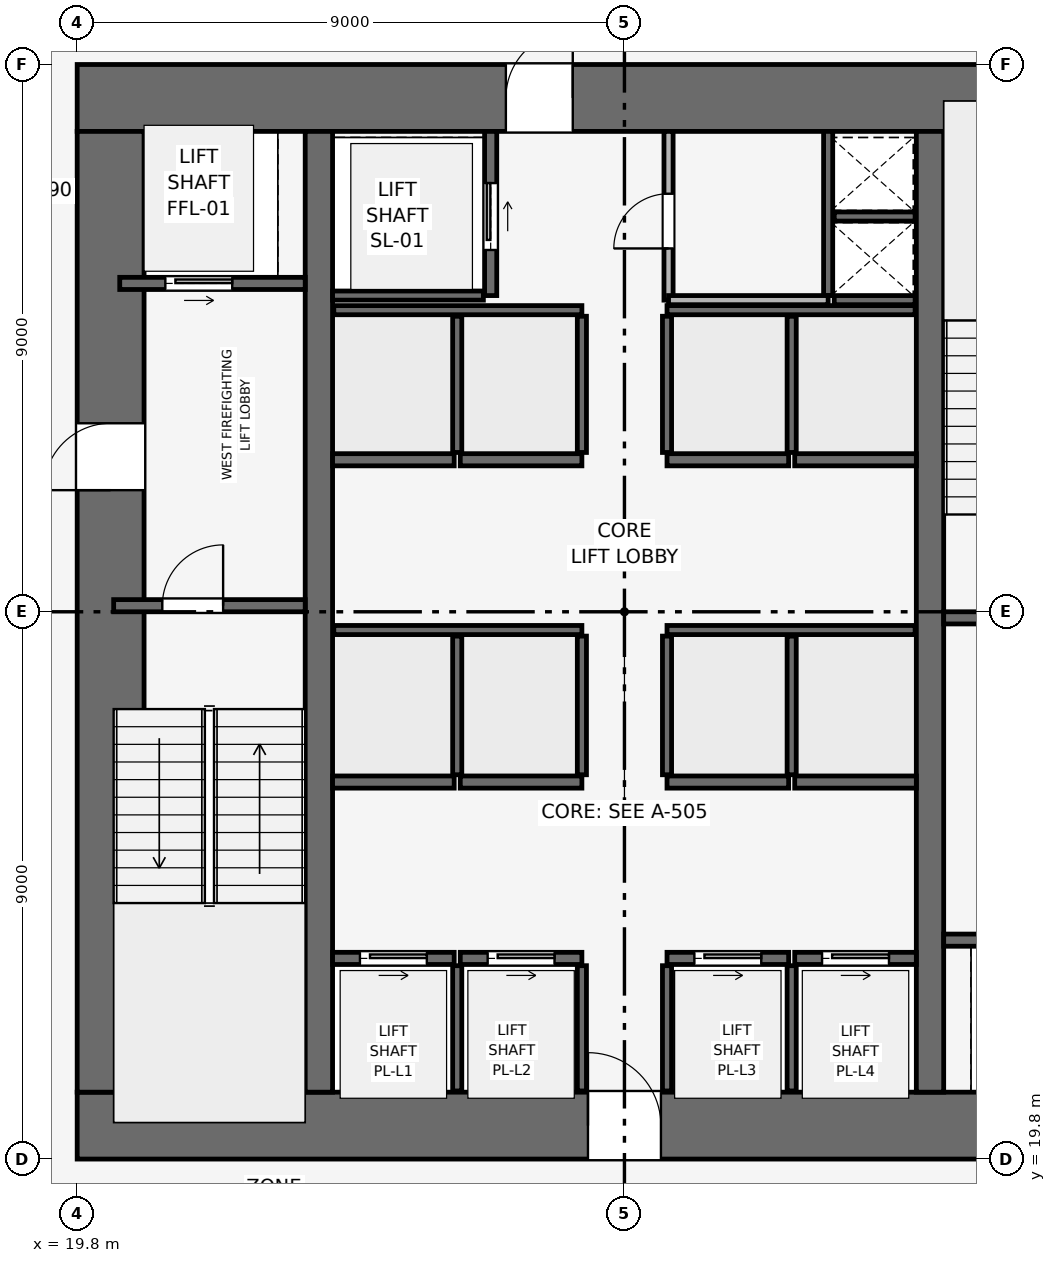
"""IFC4 building model, lengths in metres.
Left out: names, types, materials, properties, quantities, classifications, styles, units other than length and angle.
Written with IfcOpenShell. Run it as: python <this file> out.ifc"""

import sys

from ifc_helpers import new_model, si_unit, direction, frame, frame_2d, origin, place, context, subcontext, project, spatial, rectangle, extrude, element, fill, save


model = new_model("IFC4")
c1 = context("Model", 3, precision=1e-05, world=origin(), true_north=direction((0.0, 1.0)))
c2 = subcontext(c1, "Body", "Model", "MODEL_VIEW")
j1 = project(units=[si_unit("LENGTHUNIT", "METRE"), si_unit("PLANEANGLEUNIT", "RADIAN")], contexts=[c1])
p1 = place(None, origin())
s1 = spatial("IfcSite", under=j1, at=p1, CompositionType="ELEMENT")
p2 = place(p1, origin())
s2 = spatial("IfcBuilding", under=s1, at=p2, CompositionType="ELEMENT")
p3 = place(p2, frame((0.0, 0.0, 72.9)))
s3 = spatial("IfcBuildingStorey", under=s2, at=p3, CompositionType="ELEMENT", Elevation=72.9)
p4 = place(p3, frame((19.8, 20.35, 0.0), z_axis=(0.0, 0.0, 1.0), x_axis=(1.0, 0.0, 0.0)))
e1 = element("IfcWall", 1, at=p4, inside=s3, PredefinedType="SHEAR", context=c2, shape_type="SweptSolid", body=[
    extrude(rectangle(XDim=18.0, YDim=1.1, at=frame_2d((9.0, 0.0))), origin(), (0.0, 0.0, 1.0), 3.9),
])
p5 = place(p4, frame((8.4, 0.0, 0.0)))
e2 = element("IfcOpeningElement", 2, at=p5, cuts=e1, PredefinedType="OPENING", context=c2, shape_type="SweptSolid", body=[
    extrude(rectangle(XDim=1.2, YDim=2.2, at=frame_2d((0.6, 1.1))), frame((0.0, 0.56, 0.0), z_axis=(0.0, -1.0, 0.0), x_axis=(1.0, 0.0, 0.0)), (0.0, 0.0, 1.0), 1.12),
])
p6 = place(p3, frame((19.8, 37.25, 0.0), z_axis=(0.0, 0.0, 1.0), x_axis=(1.0, 0.0, 0.0)))
e3 = element("IfcWall", 3, at=p6, inside=s3, PredefinedType="SHEAR", context=c2, shape_type="SweptSolid", body=[
    extrude(rectangle(XDim=18.0, YDim=1.1, at=frame_2d((9.0, 0.0))), origin(), (0.0, 0.0, 1.0), 3.9),
])
p7 = place(p6, frame((7.05, 0.0, 0.0)))
e4 = element("IfcOpeningElement", 4, at=p7, cuts=e3, PredefinedType="OPENING", context=c2, shape_type="SweptSolid", body=[
    extrude(rectangle(XDim=1.1, YDim=2.15, at=frame_2d((0.55, 1.075))), frame((0.0, 0.56, 0.0), z_axis=(0.0, -1.0, 0.0), x_axis=(1.0, 0.0, 0.0)), (0.0, 0.0, 1.0), 1.12),
])
p8 = place(p3, frame((20.35, 20.9, 0.0), z_axis=(0.0, 0.0, 1.0), x_axis=(0.0, 1.0, 0.0)))
e5 = element("IfcWall", 5, at=p8, inside=s3, PredefinedType="SHEAR", context=c2, shape_type="SweptSolid", body=[
    extrude(rectangle(XDim=15.8, YDim=1.1, at=frame_2d((7.9, 0.0))), origin(), (0.0, 0.0, 1.0), 3.9),
])
p9 = place(p8, frame((9.9, 0.0, 0.0)))
e6 = element("IfcOpeningElement", 6, at=p9, cuts=e5, PredefinedType="OPENING", context=c2, shape_type="SweptSolid", body=[
    extrude(rectangle(XDim=1.1, YDim=2.15, at=frame_2d((0.55, 1.075))), frame((0.0, 0.56, 0.0), z_axis=(0.0, -1.0, 0.0), x_axis=(1.0, 0.0, 0.0)), (0.0, 0.0, 1.0), 1.12),
])
for number, where, z_axis, x_axis in (
    (7, (23.775, 20.9, 0.0), (0.0, 0.0, 1.0), (0.0, 1.0, 0.0)),
    (8, (33.825, 20.9, 0.0), (0.0, 0.0, 1.0), (0.0, 1.0, 0.0)),
):
    element("IfcWall", number, at=place(p3, frame(where, z_axis=z_axis, x_axis=x_axis)), inside=s3, PredefinedType="SHEAR", context=c2, shape_type="SweptSolid", body=[
        extrude(rectangle(XDim=15.8, YDim=0.45, at=frame_2d((7.9, 0.0))), origin(), (0.0, 0.0, 1.0), 3.9),
    ])
p10 = place(p3, frame((20.4, 28.9, 0.0), z_axis=(0.0, 0.0, 1.0), x_axis=(1.0, 0.0, 0.0)))
e9 = element("IfcWall", 9, at=p10, inside=s3, PredefinedType="SHEAR", context=c2, shape_type="SweptSolid", body=[
    extrude(rectangle(XDim=3.15, YDim=0.2, at=frame_2d((1.575, 0.0))), origin(), (0.0, 0.0, 1.0), 3.65),
])
p11 = place(p10, frame((0.8, 0.0, 0.0)))
e10 = element("IfcOpeningElement", 10, at=p11, cuts=e9, PredefinedType="OPENING", context=c2, shape_type="SweptSolid", body=[
    extrude(rectangle(XDim=1.0, YDim=2.1, at=frame_2d((0.5, 1.05))), frame((0.0, 0.11, 0.0), z_axis=(0.0, -1.0, 0.0), x_axis=(1.0, 0.0, 0.0)), (0.0, 0.0, 1.0), 0.22),
])
p12 = place(p3, frame((34.05, 28.7, 0.0), z_axis=(0.0, 0.0, 1.0), x_axis=(1.0, 0.0, 0.0)))
e11 = element("IfcWall", 11, at=p12, inside=s3, PredefinedType="SHEAR", context=c2, shape_type="SweptSolid", body=[
    extrude(rectangle(XDim=3.15, YDim=0.2, at=frame_2d((1.575, 0.0))), origin(), (0.0, 0.0, 1.0), 3.65),
])
p13 = place(p12, frame((0.8, 0.0, 0.0)))
e12 = element("IfcOpeningElement", 12, at=p13, cuts=e11, PredefinedType="OPENING", context=c2, shape_type="SweptSolid", body=[
    extrude(rectangle(XDim=1.0, YDim=2.1, at=frame_2d((0.5, 1.05))), frame((0.0, 0.11, 0.0), z_axis=(0.0, -1.0, 0.0), x_axis=(1.0, 0.0, 0.0)), (0.0, 0.0, 1.0), 0.22),
])
p14 = place(p3, frame((32.15, 34.0, 0.0), z_axis=(0.0, 0.0, 1.0), x_axis=(0.0, 1.0, 0.0)))
e13 = element("IfcWall", 13, at=p14, inside=s3, PredefinedType="SHEAR", context=c2, shape_type="SweptSolid", body=[
    extrude(rectangle(XDim=2.7, YDim=0.15, at=frame_2d((1.35, 0.0))), origin(), (0.0, 0.0, 1.0), 3.65),
])
for number, where, z_axis, x_axis in (
    (14, (32.25, 33.925, 0.0), (0.0, 0.0, 1.0), (1.0, 0.0, 0.0)),
    (15, (32.25, 35.3, 0.0), (0.0, 0.0, 1.0), (1.0, 0.0, 0.0)),
):
    element("IfcWall", number, at=place(p3, frame(where, z_axis=z_axis, x_axis=x_axis)), inside=s3, PredefinedType="SHEAR", context=c2, shape_type="SweptSolid", body=[
        extrude(rectangle(XDim=1.33, YDim=0.15, at=frame_2d((0.665, 0.0))), origin(), (0.0, 0.0, 1.0), 3.65),
    ])
p15 = place(p3, frame((20.5, 34.2, 0.0), z_axis=(0.0, 0.0, 1.0), x_axis=(1.0, 0.0, 0.0)))
e16 = element("IfcWall", 16, at=p15, inside=s3, PredefinedType="SHEAR", context=c2, shape_type="SweptSolid", body=[
    extrude(rectangle(XDim=3.05, YDim=0.2, at=frame_2d((1.525, 0.0))), origin(), (0.0, 0.0, 1.0), 3.65),
])
p16 = place(p15, frame((0.75, 0.0, 0.0)))
e17 = element("IfcOpeningElement", 17, at=p16, cuts=e16, PredefinedType="OPENING", context=c2, shape_type="SweptSolid", body=[
    extrude(rectangle(XDim=1.1, YDim=2.15, at=frame_2d((0.55, 1.075))), frame((0.0, 0.11, 0.0), z_axis=(0.0, -1.0, 0.0), x_axis=(1.0, 0.0, 0.0)), (0.0, 0.0, 1.0), 0.22),
])
p17 = place(p3, frame((34.05, 23.4, 0.0), z_axis=(0.0, 0.0, 1.0), x_axis=(1.0, 0.0, 0.0)))
e18 = element("IfcWall", 18, at=p17, inside=s3, PredefinedType="SHEAR", context=c2, shape_type="SweptSolid", body=[
    extrude(rectangle(XDim=3.05, YDim=0.2, at=frame_2d((1.525, 0.0))), origin(), (0.0, 0.0, 1.0), 3.65),
])
p18 = place(p17, frame((1.2, 0.0, 0.0)))
e19 = element("IfcOpeningElement", 19, at=p18, cuts=e18, PredefinedType="OPENING", context=c2, shape_type="SweptSolid", body=[
    extrude(rectangle(XDim=1.1, YDim=2.15, at=frame_2d((0.55, 1.075))), frame((0.0, 0.11, 0.0), z_axis=(0.0, -1.0, 0.0), x_axis=(1.0, 0.0, 0.0)), (0.0, 0.0, 1.0), 0.22),
])
p19 = place(p3, frame((26.6, 34.0, 0.0), z_axis=(0.0, 0.0, 1.0), x_axis=(0.0, 1.0, 0.0)))
e20 = element("IfcWall", 20, at=p19, inside=s3, PredefinedType="SHEAR", context=c2, shape_type="SweptSolid", body=[
    extrude(rectangle(XDim=2.7, YDim=0.2, at=frame_2d((1.35, 0.0))), origin(), (0.0, 0.0, 1.0), 3.65),
])
p20 = place(p19, frame((0.75, 0.0, 0.0)))
e21 = element("IfcOpeningElement", 21, at=p20, cuts=e20, PredefinedType="OPENING", context=c2, shape_type="SweptSolid", body=[
    extrude(rectangle(XDim=1.1, YDim=2.15, at=frame_2d((0.55, 1.075))), frame((0.0, 0.11, 0.0), z_axis=(0.0, -1.0, 0.0), x_axis=(1.0, 0.0, 0.0)), (0.0, 0.0, 1.0), 0.22),
])
p21 = place(p3, frame((24.0, 34.0, 0.0), z_axis=(0.0, 0.0, 1.0), x_axis=(1.0, 0.0, 0.0)))
e22 = element("IfcWall", 22, at=p21, inside=s3, PredefinedType="SHEAR", context=c2, shape_type="SweptSolid", body=[
    extrude(rectangle(XDim=2.48, YDim=0.15, at=frame_2d((1.24, 0.0))), origin(), (0.0, 0.0, 1.0), 3.65),
])
p22 = place(p3, frame((24.0, 23.1, 0.0), z_axis=(0.0, 0.0, 1.0), x_axis=(1.0, 0.0, 0.0)))
e23 = element("IfcWall", 23, at=p22, inside=s3, PredefinedType="SHEAR", context=c2, shape_type="SweptSolid", body=[
    extrude(rectangle(XDim=2.0, YDim=0.2, at=frame_2d((1.0, 0.0))), origin(), (0.0, 0.0, 1.0), 3.65),
])
p23 = place(p22, frame((0.45, 0.0, 0.0)))
e24 = element("IfcOpeningElement", 24, at=p23, cuts=e23, PredefinedType="OPENING", context=c2, shape_type="SweptSolid", body=[
    extrude(rectangle(XDim=1.1, YDim=2.15, at=frame_2d((0.55, 1.075))), frame((0.0, 0.11, 0.0), z_axis=(0.0, -1.0, 0.0), x_axis=(1.0, 0.0, 0.0)), (0.0, 0.0, 1.0), 0.22),
])
p24 = place(p3, frame((26.1, 23.1, 0.0), z_axis=(0.0, 0.0, 1.0), x_axis=(1.0, 0.0, 0.0)))
e25 = element("IfcWall", 25, at=p24, inside=s3, PredefinedType="SHEAR", context=c2, shape_type="SweptSolid", body=[
    extrude(rectangle(XDim=2.0, YDim=0.2, at=frame_2d((1.0, 0.0))), origin(), (0.0, 0.0, 1.0), 3.65),
])
p25 = place(p24, frame((0.45, 0.0, 0.0)))
e26 = element("IfcOpeningElement", 26, at=p25, cuts=e25, PredefinedType="OPENING", context=c2, shape_type="SweptSolid", body=[
    extrude(rectangle(XDim=1.1, YDim=2.15, at=frame_2d((0.55, 1.075))), frame((0.0, 0.11, 0.0), z_axis=(0.0, -1.0, 0.0), x_axis=(1.0, 0.0, 0.0)), (0.0, 0.0, 1.0), 0.22),
])
p26 = place(p3, frame((29.5, 23.1, 0.0), z_axis=(0.0, 0.0, 1.0), x_axis=(1.0, 0.0, 0.0)))
e27 = element("IfcWall", 27, at=p26, inside=s3, PredefinedType="SHEAR", context=c2, shape_type="SweptSolid", body=[
    extrude(rectangle(XDim=2.0, YDim=0.2, at=frame_2d((1.0, 0.0))), origin(), (0.0, 0.0, 1.0), 3.65),
])
p27 = place(p26, frame((0.45, 0.0, 0.0)))
e28 = element("IfcOpeningElement", 28, at=p27, cuts=e27, PredefinedType="OPENING", context=c2, shape_type="SweptSolid", body=[
    extrude(rectangle(XDim=1.1, YDim=2.15, at=frame_2d((0.55, 1.075))), frame((0.0, 0.11, 0.0), z_axis=(0.0, -1.0, 0.0), x_axis=(1.0, 0.0, 0.0)), (0.0, 0.0, 1.0), 0.22),
])
p28 = place(p3, frame((31.6, 23.1, 0.0), z_axis=(0.0, 0.0, 1.0), x_axis=(1.0, 0.0, 0.0)))
e29 = element("IfcWall", 29, at=p28, inside=s3, PredefinedType="SHEAR", context=c2, shape_type="SweptSolid", body=[
    extrude(rectangle(XDim=2.0, YDim=0.2, at=frame_2d((1.0, 0.0))), origin(), (0.0, 0.0, 1.0), 3.65),
])
p29 = place(p28, frame((0.45, 0.0, 0.0)))
e30 = element("IfcOpeningElement", 30, at=p29, cuts=e29, PredefinedType="OPENING", context=c2, shape_type="SweptSolid", body=[
    extrude(rectangle(XDim=1.1, YDim=2.15, at=frame_2d((0.55, 1.075))), frame((0.0, 0.11, 0.0), z_axis=(0.0, -1.0, 0.0), x_axis=(1.0, 0.0, 0.0)), (0.0, 0.0, 1.0), 0.22),
])
for number, where, z_axis, x_axis in (
    (31, (24.0, 26.0, 0.0), (0.0, 0.0, 1.0), (1.0, 0.0, 0.0)),
    (32, (26.1, 26.0, 0.0), (0.0, 0.0, 1.0), (1.0, 0.0, 0.0)),
    (33, (29.5, 26.0, 0.0), (0.0, 0.0, 1.0), (1.0, 0.0, 0.0)),
    (34, (31.6, 26.0, 0.0), (0.0, 0.0, 1.0), (1.0, 0.0, 0.0)),
    (35, (24.0, 31.3, 0.0), (0.0, 0.0, 1.0), (1.0, 0.0, 0.0)),
    (36, (26.1, 31.3, 0.0), (0.0, 0.0, 1.0), (1.0, 0.0, 0.0)),
    (37, (29.5, 31.3, 0.0), (0.0, 0.0, 1.0), (1.0, 0.0, 0.0)),
    (38, (31.6, 31.3, 0.0), (0.0, 0.0, 1.0), (1.0, 0.0, 0.0)),
):
    element("IfcWall", number, at=place(p3, frame(where, z_axis=z_axis, x_axis=x_axis)), inside=s3, PredefinedType="SHEAR", context=c2, shape_type="SweptSolid", body=[
        extrude(rectangle(XDim=2.0, YDim=0.2, at=frame_2d((1.0, 0.0))), origin(), (0.0, 0.0, 1.0), 3.65),
    ])
for number, where, z_axis, x_axis in (
    (39, (26.05, 20.92, 0.0), (0.0, 0.0, 1.0), (0.0, 1.0, 0.0)),
    (40, (28.1, 20.92, 0.0), (0.0, 0.0, 1.0), (0.0, 1.0, 0.0)),
    (41, (29.5, 20.92, 0.0), (0.0, 0.0, 1.0), (0.0, 1.0, 0.0)),
    (42, (31.55, 20.92, 0.0), (0.0, 0.0, 1.0), (0.0, 1.0, 0.0)),
):
    element("IfcWall", number, at=place(p3, frame(where, z_axis=z_axis, x_axis=x_axis)), inside=s3, PredefinedType="SHEAR", context=c2, shape_type="SweptSolid", body=[
        extrude(rectangle(XDim=2.06, YDim=0.15, at=frame_2d((1.03, 0.0))), origin(), (0.0, 0.0, 1.0), 3.65),
    ])
for number, where, z_axis, x_axis in (
    (43, (24.02, 28.5, 0.0), (0.0, 0.0, 1.0), (1.0, 0.0, 0.0)),
    (44, (29.5, 28.5, 0.0), (0.0, 0.0, 1.0), (1.0, 0.0, 0.0)),
):
    element("IfcWall", number, at=place(p3, frame(where, z_axis=z_axis, x_axis=x_axis)), inside=s3, PredefinedType="SHEAR", context=c2, shape_type="SweptSolid", body=[
        extrude(rectangle(XDim=4.08, YDim=0.15, at=frame_2d((2.04, 0.0))), origin(), (0.0, 0.0, 1.0), 3.65),
    ])
for number, where, z_axis, x_axis in (
    (45, (26.05, 26.12, 0.0), (0.0, 0.0, 1.0), (0.0, 1.0, 0.0)),
    (46, (28.1, 26.12, 0.0), (0.0, 0.0, 1.0), (0.0, 1.0, 0.0)),
    (47, (29.5, 26.12, 0.0), (0.0, 0.0, 1.0), (0.0, 1.0, 0.0)),
    (48, (31.55, 26.12, 0.0), (0.0, 0.0, 1.0), (0.0, 1.0, 0.0)),
):
    element("IfcWall", number, at=place(p3, frame(where, z_axis=z_axis, x_axis=x_axis)), inside=s3, PredefinedType="SHEAR", context=c2, shape_type="SweptSolid", body=[
        extrude(rectangle(XDim=2.28, YDim=0.15, at=frame_2d((1.14, 0.0))), origin(), (0.0, 0.0, 1.0), 3.65),
    ])
for number, where, z_axis, x_axis in (
    (49, (24.02, 33.76, 0.0), (0.0, 0.0, 1.0), (1.0, 0.0, 0.0)),
    (50, (29.5, 33.76, 0.0), (0.0, 0.0, 1.0), (1.0, 0.0, 0.0)),
):
    element("IfcWall", number, at=place(p3, frame(where, z_axis=z_axis, x_axis=x_axis)), inside=s3, PredefinedType="SHEAR", context=c2, shape_type="SweptSolid", body=[
        extrude(rectangle(XDim=4.08, YDim=0.15, at=frame_2d((2.04, 0.0))), origin(), (0.0, 0.0, 1.0), 3.65),
    ])
for number, where, z_axis, x_axis in (
    (51, (26.05, 31.42, 0.0), (0.0, 0.0, 1.0), (0.0, 1.0, 0.0)),
    (52, (28.1, 31.42, 0.0), (0.0, 0.0, 1.0), (0.0, 1.0, 0.0)),
    (53, (29.5, 31.42, 0.0), (0.0, 0.0, 1.0), (0.0, 1.0, 0.0)),
    (54, (31.55, 31.42, 0.0), (0.0, 0.0, 1.0), (0.0, 1.0, 0.0)),
):
    element("IfcWall", number, at=place(p3, frame(where, z_axis=z_axis, x_axis=x_axis)), inside=s3, PredefinedType="SHEAR", context=c2, shape_type="SweptSolid", body=[
        extrude(rectangle(XDim=2.24, YDim=0.15, at=frame_2d((1.12, 0.0))), origin(), (0.0, 0.0, 1.0), 3.65),
    ])
p30 = place(p3, frame((29.525, 33.925, 0.0), z_axis=(0.0, 0.0, 1.0), x_axis=(0.0, 1.0, 0.0)))
e55 = element("IfcWall", 55, at=p30, inside=s3, PredefinedType="PARTITIONING", context=c2, shape_type="SweptSolid", body=[
    extrude(rectangle(XDim=2.775, YDim=0.15, at=frame_2d((1.387, 0.0))), origin(), (0.0, 0.0, 1.0), 3.65),
])
p31 = place(p30, frame((0.85, 0.0, 0.0)))
e56 = element("IfcOpeningElement", 56, at=p31, cuts=e55, PredefinedType="OPENING", context=c2, shape_type="SweptSolid", body=[
    extrude(rectangle(XDim=0.9, YDim=2.1, at=frame_2d((0.45, 1.05))), frame((0.0, 0.085, 0.0), z_axis=(0.0, -1.0, 0.0), x_axis=(1.0, 0.0, 0.0)), (0.0, 0.0, 1.0), 0.17),
])
p32 = place(p3, frame((29.525, 33.925, 0.0), z_axis=(0.0, 0.0, 1.0), x_axis=(1.0, 0.0, 0.0)))
e57 = element("IfcWall", 57, at=p32, inside=s3, PredefinedType="PARTITIONING", context=c2, shape_type="SweptSolid", body=[
    extrude(rectangle(XDim=2.625, YDim=0.15, at=frame_2d((1.312, 0.0))), origin(), (0.0, 0.0, 1.0), 3.65),
])
p33 = place(p11, origin())
e58 = element("IfcDoor", 58, at=p33, inside=s3, OperationType="SINGLE_SWING_RIGHT", PredefinedType="DOOR", context=c2, shape_type="SweptSolid", body=[
    extrude(rectangle(XDim=1.0, YDim=2.1, at=frame_2d((0.5, 1.05))), frame((0.0, 0.025, 0.0), z_axis=(0.0, -1.0, 0.0), x_axis=(1.0, 0.0, 0.0)), (0.0, 0.0, 1.0), 0.05),
])
fill(e10, e58)
p34 = place(p16, origin())
e59 = element("IfcDoor", 59, at=p34, inside=s3, OperationType="SLIDING_TO_RIGHT", PredefinedType="DOOR", context=c2, shape_type="SweptSolid", body=[
    extrude(rectangle(XDim=1.1, YDim=2.15, at=frame_2d((0.55, 1.075))), frame((0.0, 0.025, 0.0), z_axis=(0.0, -1.0, 0.0), x_axis=(1.0, 0.0, 0.0)), (0.0, 0.0, 1.0), 0.05),
])
fill(e17, e59)
p35 = place(p20, origin())
e60 = element("IfcDoor", 60, at=p35, inside=s3, OperationType="SLIDING_TO_RIGHT", PredefinedType="DOOR", context=c2, shape_type="SweptSolid", body=[
    extrude(rectangle(XDim=1.1, YDim=2.15, at=frame_2d((0.55, 1.075))), frame((0.0, 0.025, 0.0), z_axis=(0.0, -1.0, 0.0), x_axis=(1.0, 0.0, 0.0)), (0.0, 0.0, 1.0), 0.05),
])
fill(e21, e60)
p36 = place(p23, origin())
e61 = element("IfcDoor", 61, at=p36, inside=s3, OperationType="SLIDING_TO_RIGHT", PredefinedType="DOOR", context=c2, shape_type="SweptSolid", body=[
    extrude(rectangle(XDim=1.1, YDim=2.15, at=frame_2d((0.55, 1.075))), frame((0.0, 0.025, 0.0), z_axis=(0.0, -1.0, 0.0), x_axis=(1.0, 0.0, 0.0)), (0.0, 0.0, 1.0), 0.05),
])
fill(e24, e61)
p37 = place(p25, origin())
e62 = element("IfcDoor", 62, at=p37, inside=s3, OperationType="SLIDING_TO_RIGHT", PredefinedType="DOOR", context=c2, shape_type="SweptSolid", body=[
    extrude(rectangle(XDim=1.1, YDim=2.15, at=frame_2d((0.55, 1.075))), frame((0.0, 0.025, 0.0), z_axis=(0.0, -1.0, 0.0), x_axis=(1.0, 0.0, 0.0)), (0.0, 0.0, 1.0), 0.05),
])
fill(e26, e62)
p38 = place(p27, origin())
e63 = element("IfcDoor", 63, at=p38, inside=s3, OperationType="SLIDING_TO_RIGHT", PredefinedType="DOOR", context=c2, shape_type="SweptSolid", body=[
    extrude(rectangle(XDim=1.1, YDim=2.15, at=frame_2d((0.55, 1.075))), frame((0.0, 0.025, 0.0), z_axis=(0.0, -1.0, 0.0), x_axis=(1.0, 0.0, 0.0)), (0.0, 0.0, 1.0), 0.05),
])
fill(e28, e63)
p39 = place(p29, origin())
e64 = element("IfcDoor", 64, at=p39, inside=s3, OperationType="SLIDING_TO_RIGHT", PredefinedType="DOOR", context=c2, shape_type="SweptSolid", body=[
    extrude(rectangle(XDim=1.1, YDim=2.15, at=frame_2d((0.55, 1.075))), frame((0.0, 0.025, 0.0), z_axis=(0.0, -1.0, 0.0), x_axis=(1.0, 0.0, 0.0)), (0.0, 0.0, 1.0), 0.05),
])
fill(e30, e64)
p40 = place(p31, origin())
e65 = element("IfcDoor", 65, at=p40, inside=s3, OperationType="SINGLE_SWING_LEFT", PredefinedType="DOOR", context=c2, shape_type="SweptSolid", body=[
    extrude(rectangle(XDim=0.9, YDim=2.1, at=frame_2d((0.45, 1.05))), frame((0.0, 0.025, 0.0), z_axis=(0.0, -1.0, 0.0), x_axis=(1.0, 0.0, 0.0)), (0.0, 0.0, 1.0), 0.05),
])
fill(e56, e65)
p41 = place(p9, origin())
e66 = element("IfcDoor", 66, at=p41, inside=s3, OperationType="SINGLE_SWING_LEFT", PredefinedType="DOOR", context=c2, shape_type="SweptSolid", body=[
    extrude(rectangle(XDim=1.1, YDim=2.15, at=frame_2d((0.55, 1.075))), frame((0.0, 0.025, 0.0), z_axis=(0.0, -1.0, 0.0), x_axis=(1.0, 0.0, 0.0)), (0.0, 0.0, 1.0), 0.05),
])
fill(e6, e66)
p42 = place(p5, origin())
e67 = element("IfcDoor", 67, at=p42, inside=s3, OperationType="SINGLE_SWING_LEFT", PredefinedType="DOOR", context=c2, shape_type="SweptSolid", body=[
    extrude(rectangle(XDim=1.2, YDim=2.2, at=frame_2d((0.6, 1.1))), frame((0.0, 0.025, 0.0), z_axis=(0.0, -1.0, 0.0), x_axis=(1.0, 0.0, 0.0)), (0.0, 0.0, 1.0), 0.05),
])
fill(e2, e67)
p43 = place(p7, origin())
e68 = element("IfcDoor", 68, at=p43, inside=s3, OperationType="SINGLE_SWING_RIGHT", PredefinedType="DOOR", context=c2, shape_type="SweptSolid", body=[
    extrude(rectangle(XDim=1.1, YDim=2.15, at=frame_2d((0.55, 1.075))), frame((0.0, 0.025, 0.0), z_axis=(0.0, -1.0, 0.0), x_axis=(1.0, 0.0, 0.0)), (0.0, 0.0, 1.0), 0.05),
])
fill(e4, e68)
save(model, sys.argv[1])
